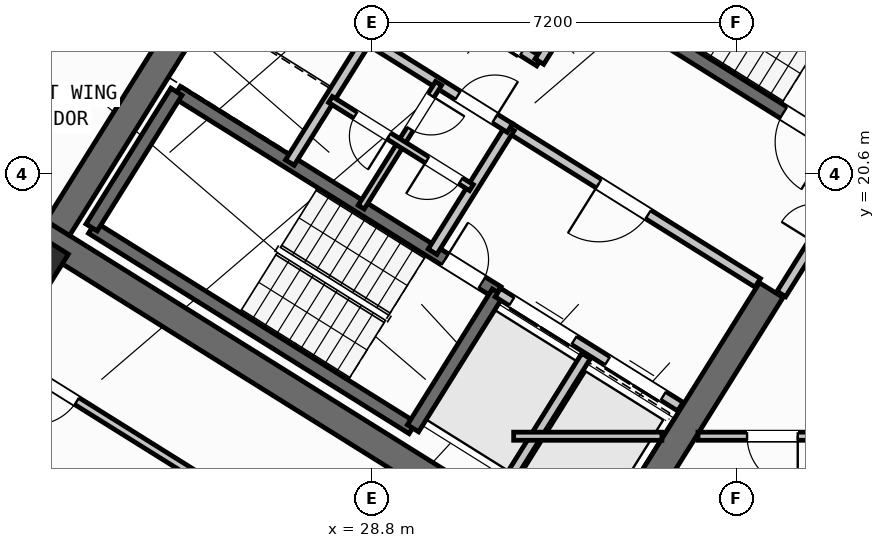
"""IFC4 building model, lengths in metres.
Left out: names, types, materials, properties, quantities, classifications, styles, units other than length and angle.
Written with IfcOpenShell. Run it as: python <this file> out.ifc"""

import sys

from ifc_helpers import new_model, si_unit, direction, frame, frame_2d, origin, origin_2d, place, context, subcontext, project, spatial, rectangle, hollow_rectangle, extrude, source, transform, mapped, element, fill, save


model = new_model("IFC4")
c1 = context("Model", 3, precision=1e-05, world=origin(), true_north=direction((0.0, 1.0)))
c2 = subcontext(c1, "Body", "Model", "MODEL_VIEW")
j1 = project(units=[si_unit("LENGTHUNIT", "METRE"), si_unit("PLANEANGLEUNIT", "RADIAN")], contexts=[c1])
p1 = place(None, origin())
s1 = spatial("IfcSite", under=j1, at=p1, CompositionType="ELEMENT")
p2 = place(p1, origin())
s2 = spatial("IfcBuilding", under=s1, at=p2, CompositionType="ELEMENT")
p3 = place(p2, frame((0.0, 0.0, 151.5)))
s3 = spatial("IfcBuildingStorey", under=s2, at=p3, CompositionType="ELEMENT", Elevation=151.5)
p4 = place(p3, frame((33.366, 12.477, 0.0), z_axis=(0.0, 0.0, 1.0), x_axis=(-0.848047359947, 0.529920442413, 0.0)))
e1 = element("IfcWall", 1, at=p4, inside=s3, PredefinedType="SHEAR", context=c2, shape_type="SweptSolid", body=[
    extrude(rectangle(XDim=13.14, YDim=0.55, at=frame_2d((6.57, 0.0))), origin(), (0.0, 0.0, 1.0), 3.35),
])
p5 = place(p3, frame((36.683, 18.304, 0.0), z_axis=(0.0, 0.0, 1.0), x_axis=(-0.529896466841, -0.848062341122, 0.0)))
e2 = element("IfcWall", 2, at=p5, inside=s3, PredefinedType="SHEAR", context=c2, shape_type="SweptSolid", body=[
    extrude(rectangle(XDim=6.425, YDim=0.55, at=frame_2d((3.212, 0.0))), origin(), (0.0, 0.0, 1.0), 3.35),
])
p6 = place(p3, frame((26.007, 24.976, 0.0), z_axis=(0.0, 0.0, 1.0), x_axis=(-0.529923795287, -0.848045264823, 0.0)))
e3 = element("IfcWall", 3, at=p6, inside=s3, PredefinedType="SHEAR", context=c2, shape_type="SweptSolid", body=[
    extrude(rectangle(XDim=6.425, YDim=0.55, at=frame_2d((3.212, 0.0))), origin(), (0.0, 0.0, 1.0), 3.35),
])
m1 = source(origin(), c2, "Body", "SweptSolid", [
    extrude(hollow_rectangle(XDim=0.9, YDim=0.9, WallThickness=0.036, at=origin_2d()), origin(), (0.0, 0.0, 1.0), 3.6),
])
p7 = place(p3, frame((22.191, 18.87, 0.0), z_axis=(0.0, 0.0, 1.0), x_axis=(-0.848048096156, 0.529919264233, 0.0)))
e4 = element("IfcColumn", 4, at=p7, inside=s3, PredefinedType="COLUMN", context=c2, shape_type="MappedRepresentation", body=[
    mapped(m1, transform((0.0, 0.0, 0.0), scale=1.0)),
])
p8 = place(p3, frame((29.268, 6.429, 0.0), z_axis=(0.0, 0.0, 1.0), x_axis=(-0.848049971435, 0.529916263149, 0.0)))
e5 = element("IfcWall", 5, at=p8, inside=s3, PredefinedType="STANDARD", context=c2, shape_type="SweptSolid", body=[
    extrude(rectangle(XDim=31.588, YDim=0.32, at=frame_2d((15.794, 0.0))), origin(), (0.0, 0.0, 1.0), 3.35),
])
p9 = place(p8, frame((16.362, 0.0, 0.0)))
e6 = element("IfcOpeningElement", 6, at=p9, cuts=e5, PredefinedType="OPENING", context=c2, shape_type="SweptSolid", body=[
    extrude(rectangle(XDim=1.2, YDim=2.15, at=frame_2d((0.6, 1.075))), frame((0.0, 0.17, 0.0), z_axis=(0.0, -1.0, 0.0), x_axis=(1.0, 0.0, 0.0)), (0.0, 0.0, 1.0), 0.34),
])
p10 = place(p8, frame((2.989, 0.0, 0.8)))
e7 = element("IfcOpeningElement", 7, at=p10, cuts=e5, PredefinedType="OPENING", context=c2, shape_type="SweptSolid", body=[
    extrude(rectangle(XDim=2.1, YDim=1.55, at=frame_2d((1.05, 0.775))), frame((0.0, 0.17, 0.0), z_axis=(0.0, -1.0, 0.0), x_axis=(1.0, 0.0, 0.0)), (0.0, 0.0, 1.0), 0.34),
])
p11 = place(p8, frame((8.359, 0.0, 0.8)))
e8 = element("IfcOpeningElement", 8, at=p11, cuts=e5, PredefinedType="OPENING", context=c2, shape_type="SweptSolid", body=[
    extrude(rectangle(XDim=2.1, YDim=1.55, at=frame_2d((1.05, 0.775))), frame((0.0, 0.17, 0.0), z_axis=(0.0, -1.0, 0.0), x_axis=(1.0, 0.0, 0.0)), (0.0, 0.0, 1.0), 0.34),
])
p12 = place(p8, frame((13.284, 0.0, 0.95)))
e9 = element("IfcOpeningElement", 9, at=p12, cuts=e5, PredefinedType="OPENING", context=c2, shape_type="SweptSolid", body=[
    extrude(rectangle(XDim=1.2, YDim=1.4, at=frame_2d((0.6, 0.7))), frame((0.0, 0.17, 0.0), z_axis=(0.0, -1.0, 0.0), x_axis=(1.0, 0.0, 0.0)), (0.0, 0.0, 1.0), 0.34),
])
p13 = place(p8, frame((20.259, 0.0, 0.95)))
e10 = element("IfcOpeningElement", 10, at=p13, cuts=e5, PredefinedType="OPENING", context=c2, shape_type="SweptSolid", body=[
    extrude(rectangle(XDim=1.2, YDim=1.4, at=frame_2d((0.6, 0.7))), frame((0.0, 0.17, 0.0), z_axis=(0.0, -1.0, 0.0), x_axis=(1.0, 0.0, 0.0)), (0.0, 0.0, 1.0), 0.34),
])
p14 = place(p8, frame((22.929, 0.0, 0.95)))
e11 = element("IfcOpeningElement", 11, at=p14, cuts=e5, PredefinedType="OPENING", context=c2, shape_type="SweptSolid", body=[
    extrude(rectangle(XDim=1.2, YDim=1.4, at=frame_2d((0.6, 0.7))), frame((0.0, 0.17, 0.0), z_axis=(0.0, -1.0, 0.0), x_axis=(1.0, 0.0, 0.0)), (0.0, 0.0, 1.0), 0.34),
])
p15 = place(p8, frame((27.481, 0.0, 0.8)))
e12 = element("IfcOpeningElement", 12, at=p15, cuts=e5, PredefinedType="OPENING", context=c2, shape_type="SweptSolid", body=[
    extrude(rectangle(XDim=2.1, YDim=1.55, at=frame_2d((1.05, 0.775))), frame((0.0, 0.17, 0.0), z_axis=(0.0, -1.0, 0.0), x_axis=(1.0, 0.0, 0.0)), (0.0, 0.0, 1.0), 0.34),
])
p16 = place(p3, frame((29.605, 15.581, 0.0), z_axis=(0.0, 0.0, 1.0), x_axis=(-0.848036911448, 0.529937163087, 0.0)))
e13 = element("IfcWall", 13, at=p16, inside=s3, PredefinedType="SHEAR", context=c2, shape_type="SweptSolid", body=[
    extrude(rectangle(XDim=7.46, YDim=0.26, at=frame_2d((3.73, 0.0))), origin(), (0.0, 0.0, 1.0), 3.35),
])
p17 = place(p3, frame((31.28, 18.261, 0.0), z_axis=(0.0, 0.0, 1.0), x_axis=(-0.848051618787, 0.529913626805, 0.0)))
e14 = element("IfcWall", 14, at=p17, inside=s3, PredefinedType="SHEAR", context=c2, shape_type="SweptSolid", body=[
    extrude(rectangle(XDim=7.46, YDim=0.26, at=frame_2d((3.73, 0.0))), origin(), (0.0, 0.0, 1.0), 3.35),
])
p18 = place(p17, frame((0.36, 0.0, 0.0)))
e15 = element("IfcOpeningElement", 15, at=p18, cuts=e14, PredefinedType="OPENING", context=c2, shape_type="SweptSolid", body=[
    extrude(rectangle(XDim=0.86, YDim=2.05, at=frame_2d((0.43, 1.025))), frame((0.0, 0.14, 0.0), z_axis=(0.0, -1.0, 0.0), x_axis=(1.0, 0.0, 0.0)), (0.0, 0.0, 1.0), 0.28),
])
p19 = place(p3, frame((31.288, 18.256, 0.0), z_axis=(0.0, 0.0, 1.0), x_axis=(-0.529943379326, -0.848033026897, 0.0)))
e16 = element("IfcWall", 16, at=p19, inside=s3, PredefinedType="SHEAR", context=c2, shape_type="SweptSolid", body=[
    extrude(rectangle(XDim=3.16, YDim=0.26, at=frame_2d((1.58, 0.0))), origin(), (0.0, 0.0, 1.0), 3.35),
])
p20 = place(p3, frame((24.945, 22.22, 0.0), z_axis=(0.0, 0.0, 1.0), x_axis=(-0.529908658664, -0.84805472316, 0.0)))
e17 = element("IfcWall", 17, at=p20, inside=s3, PredefinedType="SHEAR", context=c2, shape_type="SweptSolid", body=[
    extrude(rectangle(XDim=3.16, YDim=0.26, at=frame_2d((1.58, 0.0))), origin(), (0.0, 0.0, 1.0), 3.35),
])
p21 = place(p3, frame((38.046, 21.108, 0.0), z_axis=(0.0, 0.0, 1.0), x_axis=(-0.848054434086, 0.529909121291, 0.0)))
e18 = element("IfcWall", 18, at=p21, inside=s3, PredefinedType="SHEAR", context=c2, shape_type="SweptSolid", body=[
    extrude(rectangle(XDim=7.33, YDim=0.26, at=frame_2d((3.665, 0.0))), origin(), (0.0, 0.0, 1.0), 3.35),
])
p22 = place(p21, frame((0.22, 0.0, 0.0)))
e19 = element("IfcOpeningElement", 19, at=p22, cuts=e18, PredefinedType="OPENING", context=c2, shape_type="SweptSolid", body=[
    extrude(rectangle(XDim=1.1, YDim=2.1, at=frame_2d((0.55, 1.05))), frame((0.0, 0.14, 0.0), z_axis=(0.0, -1.0, 0.0), x_axis=(1.0, 0.0, 0.0)), (0.0, 0.0, 1.0), 0.28),
])
p23 = place(p3, frame((34.891, 16.005, 0.0), z_axis=(0.0, 0.0, 1.0), x_axis=(-0.848062873452, 0.529895614884, 0.0)))
e20 = element("IfcWall", 20, at=p23, inside=s3, PredefinedType="STANDARD", context=c2, shape_type="SweptSolid", body=[
    extrude(rectangle(XDim=4.248, YDim=0.2, at=frame_2d((2.124, 0.0))), origin(), (0.0, 0.0, 1.0), 3.34),
])
p24 = place(p23, frame((0.398, 0.0, 0.0)))
e21 = element("IfcOpeningElement", 21, at=p24, cuts=e20, PredefinedType="OPENING", context=c2, shape_type="SweptSolid", body=[
    extrude(rectangle(XDim=1.3, YDim=2.2, at=frame_2d((0.65, 1.1))), frame((0.0, 0.11, 0.0), z_axis=(0.0, -1.0, 0.0), x_axis=(1.0, 0.0, 0.0)), (0.0, 0.0, 1.0), 0.22),
])
p25 = place(p23, frame((2.473, 0.0, 0.0)))
e22 = element("IfcOpeningElement", 22, at=p25, cuts=e20, PredefinedType="OPENING", context=c2, shape_type="SweptSolid", body=[
    extrude(rectangle(XDim=1.45, YDim=2.25, at=frame_2d((0.725, 1.125))), frame((0.0, 0.11, 0.0), z_axis=(0.0, -1.0, 0.0), x_axis=(1.0, 0.0, 0.0)), (0.0, 0.0, 1.0), 0.22),
])
p26 = place(p3, frame((36.417, 18.447, 0.0), z_axis=(0.0, 0.0, 1.0), x_axis=(-0.848064879198, 0.529892404805, 0.0)))
e23 = element("IfcWall", 23, at=p26, inside=s3, PredefinedType="STANDARD", context=c2, shape_type="SweptSolid", body=[
    extrude(rectangle(XDim=5.768, YDim=0.2, at=frame_2d((2.884, 0.0))), origin(), (0.0, 0.0, 1.0), 3.34),
])
p27 = place(p26, frame((2.548, 0.0, 0.0)))
e24 = element("IfcOpeningElement", 24, at=p27, cuts=e23, PredefinedType="OPENING", context=c2, shape_type="SweptSolid", body=[
    extrude(rectangle(XDim=1.15, YDim=2.1, at=frame_2d((0.575, 1.05))), frame((0.0, 0.11, 0.0), z_axis=(0.0, -1.0, 0.0), x_axis=(1.0, 0.0, 0.0)), (0.0, 0.0, 1.0), 0.22),
])
p28 = place(p3, frame((32.108, 22.814, 0.0), z_axis=(0.0, 0.0, 1.0), x_axis=(-0.848042229521, 0.529928652696, 0.0)))
e25 = element("IfcWall", 25, at=p28, inside=s3, PredefinedType="STANDARD", context=c2, shape_type="SweptSolid", body=[
    extrude(rectangle(XDim=5.62, YDim=0.2, at=frame_2d((2.81, 0.0))), origin(), (0.0, 0.0, 1.0), 3.34),
])
p29 = place(p28, frame((0.39, 0.0, 0.0)))
e26 = element("IfcOpeningElement", 26, at=p29, cuts=e25, PredefinedType="OPENING", context=c2, shape_type="SweptSolid", body=[
    extrude(rectangle(XDim=1.1, YDim=2.15, at=frame_2d((0.55, 1.075))), frame((0.0, 0.11, 0.0), z_axis=(0.0, -1.0, 0.0), x_axis=(1.0, 0.0, 0.0)), (0.0, 0.0, 1.0), 0.22),
])
p30 = place(p28, frame((2.25, 0.0, 0.0)))
e27 = element("IfcOpeningElement", 27, at=p30, cuts=e25, PredefinedType="OPENING", context=c2, shape_type="SweptSolid", body=[
    extrude(rectangle(XDim=1.1, YDim=2.15, at=frame_2d((0.55, 1.075))), frame((0.0, 0.11, 0.0), z_axis=(0.0, -1.0, 0.0), x_axis=(1.0, 0.0, 0.0)), (0.0, 0.0, 1.0), 0.22),
])
p31 = place(p28, frame((4.11, 0.0, 0.0)))
e28 = element("IfcOpeningElement", 28, at=p31, cuts=e25, PredefinedType="OPENING", context=c2, shape_type="SweptSolid", body=[
    extrude(rectangle(XDim=1.1, YDim=2.15, at=frame_2d((0.55, 1.075))), frame((0.0, 0.11, 0.0), z_axis=(0.0, -1.0, 0.0), x_axis=(1.0, 0.0, 0.0)), (0.0, 0.0, 1.0), 0.22),
])
p32 = place(p3, frame((32.982, 24.213, 0.0), z_axis=(0.0, 0.0, 1.0), x_axis=(-0.529839334948, -0.84809803628, 0.0)))
e29 = element("IfcWall", 29, at=p32, inside=s3, PredefinedType="STANDARD", context=c2, shape_type="SweptSolid", body=[
    extrude(rectangle(XDim=1.65, YDim=0.2, at=frame_2d((0.825, 0.0))), origin(), (0.0, 0.0, 1.0), 3.34),
])
p33 = place(p3, frame((33.029, 17.003, 0.0), z_axis=(0.0, 0.0, 1.0), x_axis=(-0.529916267533, -0.848049968695, 0.0)))
e30 = element("IfcWall", 30, at=p33, inside=s3, PredefinedType="STANDARD", context=c2, shape_type="SweptSolid", body=[
    extrude(rectangle(XDim=2.92, YDim=0.2, at=frame_2d((1.46, 0.0))), origin(), (0.0, 0.0, 1.0), 3.34),
])
for number, where, z_axis, x_axis in (
    (31, (31.525, 21.504, 0.0), (0.0, 0.0, 1.0), (-0.53, -0.848, 0.0)),
    (32, (28.71, 23.263, 0.0), (0.0, 0.0, 1.0), (-0.53, -0.848, 0.0)),
):
    element("IfcWall", number, at=place(p3, frame(where, z_axis=z_axis, x_axis=x_axis)), inside=s3, PredefinedType="STANDARD", context=c2, shape_type="SweptSolid", body=[
        extrude(rectangle(XDim=2.88, YDim=0.2, at=frame_2d((1.44, 0.0))), origin(), (0.0, 0.0, 1.0), 3.34),
    ])
p34 = place(p3, frame((31.525, 21.504, 0.0), z_axis=(0.0, 0.0, 1.0), x_axis=(-0.848040211232, 0.529931882541, 0.0)))
e33 = element("IfcWall", 33, at=p34, inside=s3, PredefinedType="STANDARD", context=c2, shape_type="SweptSolid", body=[
    extrude(rectangle(XDim=6.218, YDim=0.2, at=frame_2d((3.109, 0.0))), origin(), (0.0, 0.0, 1.0), 3.34),
])
p35 = place(p34, frame((4.4, 0.0, 0.0)))
e34 = element("IfcOpeningElement", 34, at=p35, cuts=e33, PredefinedType="OPENING", context=c2, shape_type="SweptSolid", body=[
    extrude(rectangle(XDim=0.86, YDim=2.05, at=frame_2d((0.43, 1.025))), frame((0.0, 0.11, 0.0), z_axis=(0.0, -1.0, 0.0), x_axis=(1.0, 0.0, 0.0)), (0.0, 0.0, 1.0), 0.22),
])
p36 = place(p34, frame((0.35, 0.0, 0.0)))
e35 = element("IfcOpeningElement", 35, at=p36, cuts=e33, PredefinedType="OPENING", context=c2, shape_type="SweptSolid", body=[
    extrude(rectangle(XDim=0.86, YDim=2.05, at=frame_2d((0.43, 1.025))), frame((0.0, 0.11, 0.0), z_axis=(0.0, -1.0, 0.0), x_axis=(1.0, 0.0, 0.0)), (0.0, 0.0, 1.0), 0.22),
])
p37 = place(p3, frame((30.117, 22.384, 0.0), z_axis=(0.0, 0.0, 1.0), x_axis=(-0.529951914384, -0.848027693204, 0.0)))
e36 = element("IfcWall", 36, at=p37, inside=s3, PredefinedType="PLUMBINGWALL", context=c2, shape_type="SweptSolid", body=[
    extrude(rectangle(XDim=1.4, YDim=0.14, at=frame_2d((0.7, 0.0))), origin(), (0.0, 0.0, 1.0), 3.34),
])
p38 = place(p37, frame((0.28, 0.0, 0.0)))
e37 = element("IfcOpeningElement", 37, at=p38, cuts=e36, PredefinedType="OPENING", context=c2, shape_type="SweptSolid", body=[
    extrude(rectangle(XDim=0.78, YDim=2.05, at=frame_2d((0.39, 1.025))), frame((0.0, 0.08, 0.0), z_axis=(0.0, -1.0, 0.0), x_axis=(1.0, 0.0, 0.0)), (0.0, 0.0, 1.0), 0.16),
])
p39 = place(p3, frame((29.375, 21.196, 0.0), z_axis=(0.0, 0.0, 1.0), x_axis=(-0.529865479138, -0.848081702443, 0.0)))
e38 = element("IfcWall", 38, at=p39, inside=s3, PredefinedType="PLUMBINGWALL", context=c2, shape_type="SweptSolid", body=[
    extrude(rectangle(XDim=1.48, YDim=0.14, at=frame_2d((0.74, 0.0))), origin(), (0.0, 0.0, 1.0), 3.34),
])
p40 = place(p3, frame((30.766, 20.327, 0.0), z_axis=(0.0, 0.0, 1.0), x_axis=(-0.848052663127, 0.529911955482, 0.0)))
e39 = element("IfcWall", 39, at=p40, inside=s3, PredefinedType="PLUMBINGWALL", context=c2, shape_type="SweptSolid", body=[
    extrude(rectangle(XDim=3.28, YDim=0.14, at=frame_2d((1.64, 0.0))), origin(), (0.0, 0.0, 1.0), 3.34),
])
p41 = place(p40, frame((0.25, 0.0, 0.0)))
e40 = element("IfcOpeningElement", 40, at=p41, cuts=e39, PredefinedType="OPENING", context=c2, shape_type="SweptSolid", body=[
    extrude(rectangle(XDim=0.78, YDim=2.05, at=frame_2d((0.39, 1.025))), frame((0.0, 0.08, 0.0), z_axis=(0.0, -1.0, 0.0), x_axis=(1.0, 0.0, 0.0)), (0.0, 0.0, 1.0), 0.16),
])
p42 = place(p40, frame((1.92, 0.0, 0.0)))
e41 = element("IfcOpeningElement", 41, at=p42, cuts=e39, PredefinedType="OPENING", context=c2, shape_type="SweptSolid", body=[
    extrude(rectangle(XDim=0.78, YDim=2.05, at=frame_2d((0.39, 1.025))), frame((0.0, 0.08, 0.0), z_axis=(0.0, -1.0, 0.0), x_axis=(1.0, 0.0, 0.0)), (0.0, 0.0, 1.0), 0.16),
])
p43 = place(p3, frame((32.164, 10.374, 0.0), z_axis=(0.0, 0.0, 1.0), x_axis=(-0.848044107957, 0.529925646633, 0.0)))
e42 = element("IfcWall", 42, at=p43, inside=s3, PredefinedType="PARTITIONING", context=c2, shape_type="SweptSolid", body=[
    extrude(rectangle(XDim=15.57, YDim=0.16, at=frame_2d((7.785, 0.0))), origin(), (0.0, 0.0, 1.0), 3.34),
])
p44 = place(p43, frame((10.83, 0.0, 0.0)))
e43 = element("IfcOpeningElement", 43, at=p44, cuts=e42, PredefinedType="OPENING", context=c2, shape_type="SweptSolid", body=[
    extrude(rectangle(XDim=1.0, YDim=2.1, at=frame_2d((0.5, 1.05))), frame((0.0, 0.09, 0.0), z_axis=(0.0, -1.0, 0.0), x_axis=(1.0, 0.0, 0.0)), (0.0, 0.0, 1.0), 0.18),
])
p45 = place(p3, frame((29.72, 8.859, 0.0), z_axis=(0.0, 0.0, 1.0), x_axis=(-0.848049134363, 0.529917602752, 0.0)))
e44 = element("IfcWall", 44, at=p45, inside=s3, PredefinedType="PLUMBINGWALL", context=c2, shape_type="SweptSolid", body=[
    extrude(rectangle(XDim=14.3, YDim=0.14, at=frame_2d((7.15, 0.0))), origin(), (0.0, 0.0, 1.0), 3.34),
])
p46 = place(p45, frame((9.57, 0.0, 0.0)))
e45 = element("IfcOpeningElement", 45, at=p46, cuts=e44, PredefinedType="OPENING", context=c2, shape_type="SweptSolid", body=[
    extrude(rectangle(XDim=0.92, YDim=2.08, at=frame_2d((0.46, 1.04))), frame((0.0, 0.08, 0.0), z_axis=(0.0, -1.0, 0.0), x_axis=(1.0, 0.0, 0.0)), (0.0, 0.0, 1.0), 0.16),
])
p47 = place(p3, frame((38.451, 20.737, 0.0), z_axis=(0.0, 0.0, 1.0), x_axis=(-0.529924799939, -0.848044637038, 0.0)))
e46 = element("IfcWall", 46, at=p47, inside=s3, PredefinedType="STANDARD", context=c2, shape_type="SweptSolid", body=[
    extrude(rectangle(XDim=2.96, YDim=0.2, at=frame_2d((1.48, 0.0))), origin(), (0.0, 0.0, 1.0), 3.34),
])
p48 = place(p47, frame((0.25, 0.0, 0.0)))
e47 = element("IfcOpeningElement", 47, at=p48, cuts=e46, PredefinedType="OPENING", context=c2, shape_type="SweptSolid", body=[
    extrude(rectangle(XDim=1.5, YDim=2.15, at=frame_2d((0.75, 1.075))), frame((0.0, 0.11, 0.0), z_axis=(0.0, -1.0, 0.0), x_axis=(1.0, 0.0, 0.0)), (0.0, 0.0, 1.0), 0.22),
])
p49 = place(p3, frame((31.6, 15.42, 0.0), z_axis=(0.0, 0.0, 1.0), x_axis=(1.0, 0.0, 0.0)))
e48 = element("IfcWall", 48, at=p49, inside=s3, PredefinedType="PARTITIONING", context=c2, shape_type="SweptSolid", body=[
    extrude(rectangle(XDim=2.925, YDim=0.16, at=frame_2d((1.462, 0.0))), origin(), (0.0, 0.0, 1.0), 3.34),
])
p50 = place(p3, frame((35.237, 15.42, 0.0), z_axis=(0.0, 0.0, 1.0), x_axis=(1.0, 0.0, 0.0)))
e49 = element("IfcWall", 49, at=p50, inside=s3, PredefinedType="PARTITIONING", context=c2, shape_type="SweptSolid", body=[
    extrude(rectangle(XDim=15.432, YDim=0.16, at=frame_2d((7.716, 0.0))), origin(), (0.0, 0.0, 1.0), 3.34),
])
p51 = place(p50, frame((0.969, 0.0, 0.0)))
e50 = element("IfcOpeningElement", 50, at=p51, cuts=e49, PredefinedType="OPENING", context=c2, shape_type="SweptSolid", body=[
    extrude(rectangle(XDim=1.0, YDim=2.1, at=frame_2d((0.5, 1.05))), frame((0.0, 0.09, 0.0), z_axis=(0.0, -1.0, 0.0), x_axis=(1.0, 0.0, 0.0)), (0.0, 0.0, 1.0), 0.18),
])
p52 = place(p50, frame((8.799, 0.0, 0.0)))
e51 = element("IfcOpeningElement", 51, at=p52, cuts=e49, PredefinedType="OPENING", context=c2, shape_type="SweptSolid", body=[
    extrude(rectangle(XDim=1.0, YDim=2.1, at=frame_2d((0.5, 1.05))), frame((0.0, 0.09, 0.0), z_axis=(0.0, -1.0, 0.0), x_axis=(1.0, 0.0, 0.0)), (0.0, 0.0, 1.0), 0.18),
])
m2 = source(origin(), c2, "Body", "SweptSolid", [
    extrude(rectangle(XDim=0.86, YDim=2.05, at=frame_2d((0.43, 1.025))), frame((0.0, 0.025, 0.0), z_axis=(0.0, -1.0, 0.0), x_axis=(1.0, 0.0, 0.0)), (0.0, 0.0, 1.0), 0.05),
])
p53 = place(p18, frame((0.86, 0.0, 0.0), z_axis=(0.0, 0.0, 1.0), x_axis=(-1.0, 0.0, 0.0)))
e52 = element("IfcDoor", 52, at=p53, inside=s3, OperationType="SINGLE_SWING_LEFT", PredefinedType="DOOR", context=c2, shape_type="MappedRepresentation", body=[
    mapped(m2, transform((0.0, 0.0, 0.0), scale=1.0)),
])
fill(e15, e52)
m3 = source(origin(), c2, "Body", "SweptSolid", [
    extrude(rectangle(XDim=1.1, YDim=2.1, at=frame_2d((0.55, 1.05))), frame((0.0, 0.025, 0.0), z_axis=(0.0, -1.0, 0.0), x_axis=(1.0, 0.0, 0.0)), (0.0, 0.0, 1.0), 0.05),
])
p54 = place(p22, origin())
e53 = element("IfcDoor", 53, at=p54, inside=s3, OperationType="SINGLE_SWING_LEFT", PredefinedType="DOOR", context=c2, shape_type="MappedRepresentation", body=[
    mapped(m3, transform((0.0, 0.0, 0.0), scale=1.0)),
])
fill(e19, e53)
m4 = source(origin(), c2, "Body", "SweptSolid", [
    extrude(rectangle(XDim=1.15, YDim=2.1, at=frame_2d((0.575, 1.05))), frame((0.0, 0.025, 0.0), z_axis=(0.0, -1.0, 0.0), x_axis=(1.0, 0.0, 0.0)), (0.0, 0.0, 1.0), 0.05),
])
p55 = place(p27, origin())
e54 = element("IfcDoor", 54, at=p55, inside=s3, OperationType="SINGLE_SWING_RIGHT", PredefinedType="DOOR", context=c2, shape_type="MappedRepresentation", body=[
    mapped(m4, transform((0.0, 0.0, 0.0), scale=1.0)),
])
fill(e24, e54)
m5 = source(origin(), c2, "Body", "SweptSolid", [
    extrude(rectangle(XDim=1.3, YDim=2.2, at=frame_2d((0.65, 1.1))), frame((0.0, 0.025, 0.0), z_axis=(0.0, -1.0, 0.0), x_axis=(1.0, 0.0, 0.0)), (0.0, 0.0, 1.0), 0.05),
])
p56 = place(p24, origin())
e55 = element("IfcDoor", 55, at=p56, inside=s3, OperationType="DOUBLE_DOOR_SLIDING", PredefinedType="DOOR", context=c2, shape_type="MappedRepresentation", body=[
    mapped(m5, transform((0.0, 0.0, 0.0), scale=1.0)),
])
fill(e21, e55)
m6 = source(origin(), c2, "Body", "SweptSolid", [
    extrude(rectangle(XDim=1.45, YDim=2.25, at=frame_2d((0.725, 1.125))), frame((0.0, 0.025, 0.0), z_axis=(0.0, -1.0, 0.0), x_axis=(1.0, 0.0, 0.0)), (0.0, 0.0, 1.0), 0.05),
])
p57 = place(p25, origin())
e56 = element("IfcDoor", 56, at=p57, inside=s3, OperationType="DOUBLE_DOOR_SLIDING", PredefinedType="DOOR", context=c2, shape_type="MappedRepresentation", body=[
    mapped(m6, transform((0.0, 0.0, 0.0), scale=1.0)),
])
fill(e22, e56)
p58 = place(p36, frame((0.86, 0.0, 0.0), z_axis=(0.0, 0.0, 1.0), x_axis=(-1.0, 0.0, 0.0)))
e57 = element("IfcDoor", 57, at=p58, inside=s3, OperationType="SINGLE_SWING_RIGHT", PredefinedType="DOOR", context=c2, shape_type="MappedRepresentation", body=[
    mapped(m2, transform((0.0, 0.0, 0.0), scale=1.0)),
])
fill(e35, e57)
m7 = source(origin(), c2, "Body", "SweptSolid", [
    extrude(rectangle(XDim=0.78, YDim=2.05, at=frame_2d((0.39, 1.025))), frame((0.0, 0.025, 0.0), z_axis=(0.0, -1.0, 0.0), x_axis=(1.0, 0.0, 0.0)), (0.0, 0.0, 1.0), 0.05),
])
p59 = place(p38, origin())
e58 = element("IfcDoor", 58, at=p59, inside=s3, OperationType="SINGLE_SWING_LEFT", PredefinedType="DOOR", context=c2, shape_type="MappedRepresentation", body=[
    mapped(m7, transform((0.0, 0.0, 0.0), scale=1.0)),
])
fill(e37, e58)
p60 = place(p41, origin())
e59 = element("IfcDoor", 59, at=p60, inside=s3, OperationType="SINGLE_SWING_RIGHT", PredefinedType="DOOR", context=c2, shape_type="MappedRepresentation", body=[
    mapped(m7, transform((0.0, 0.0, 0.0), scale=1.0)),
])
fill(e40, e59)
p61 = place(p42, origin())
e60 = element("IfcDoor", 60, at=p61, inside=s3, OperationType="SINGLE_SWING_LEFT", PredefinedType="DOOR", context=c2, shape_type="MappedRepresentation", body=[
    mapped(m7, transform((0.0, 0.0, 0.0), scale=1.0)),
])
fill(e41, e60)
m8 = source(origin(), c2, "Body", "SweptSolid", [
    extrude(rectangle(XDim=1.0, YDim=2.1, at=frame_2d((0.5, 1.05))), frame((0.0, 0.025, 0.0), z_axis=(0.0, -1.0, 0.0), x_axis=(1.0, 0.0, 0.0)), (0.0, 0.0, 1.0), 0.05),
])
p62 = place(p44, origin())
e61 = element("IfcDoor", 61, at=p62, inside=s3, OperationType="SINGLE_SWING_RIGHT", PredefinedType="DOOR", context=c2, shape_type="MappedRepresentation", body=[
    mapped(m8, transform((0.0, 0.0, 0.0), scale=1.0)),
])
fill(e43, e61)
p63 = place(p51, frame((1.0, 0.0, 0.0), z_axis=(0.0, 0.0, 1.0), x_axis=(-1.0, 0.0, 0.0)))
e62 = element("IfcDoor", 62, at=p63, inside=s3, OperationType="SINGLE_SWING_LEFT", PredefinedType="DOOR", context=c2, shape_type="MappedRepresentation", body=[
    mapped(m8, transform((0.0, 0.0, 0.0), scale=1.0)),
])
fill(e50, e62)
save(model, sys.argv[1])
